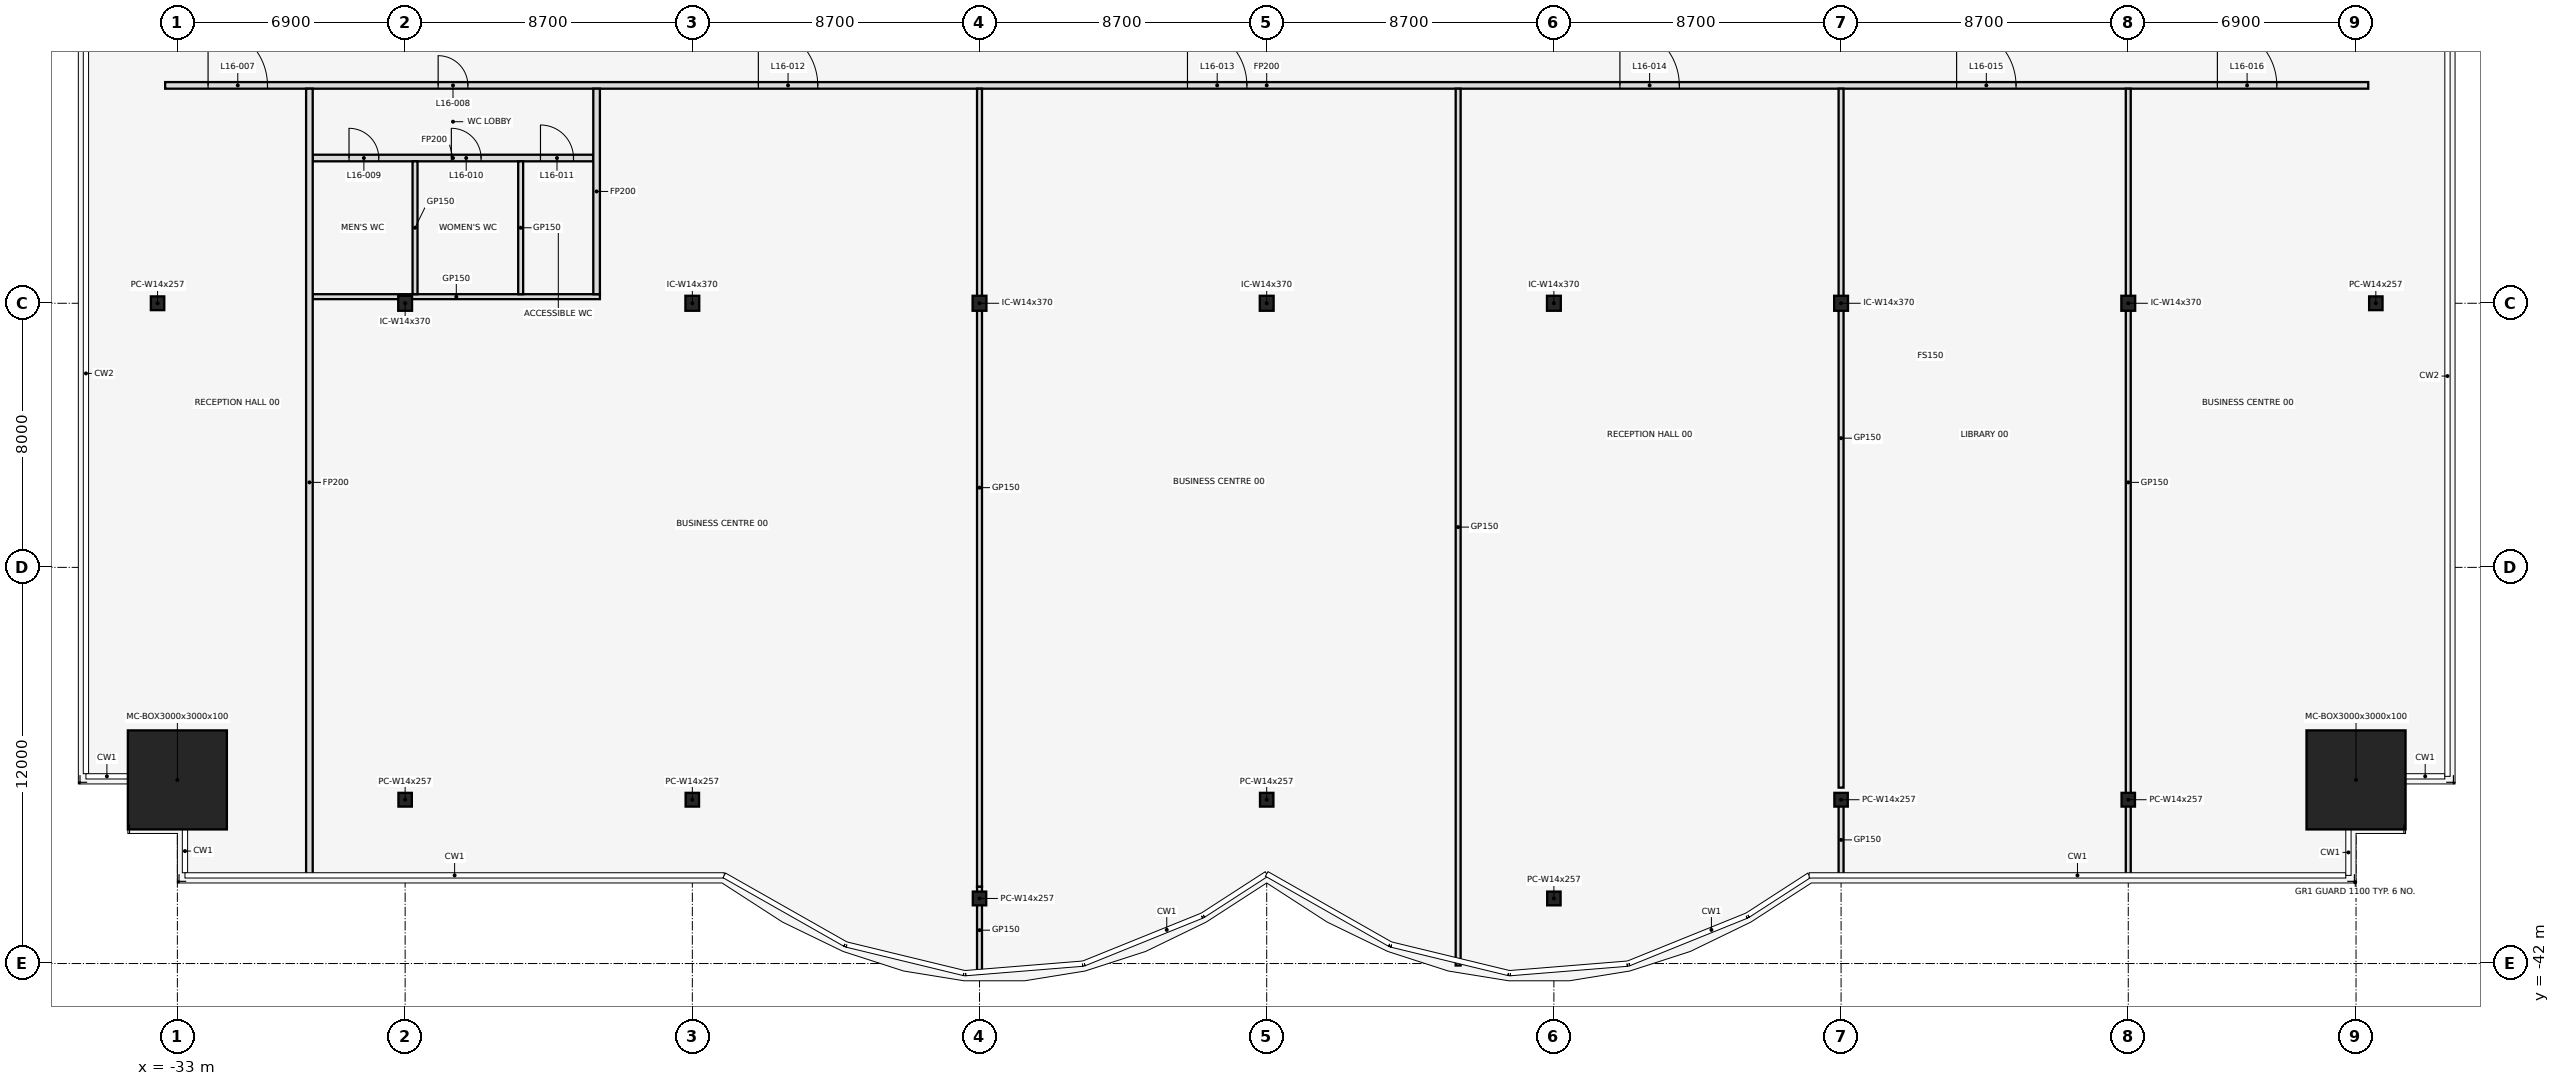
"""IFC4 building model, lengths in metres.
Left out: names, types, materials, properties, quantities, classifications, styles, units other than length and angle.
Written with IfcOpenShell. Run it as: python <this file> out.ifc"""

import sys

from ifc_helpers import new_model, si_unit, direction, frame, frame_2d, origin, origin_2d, place, context, subcontext, project, spatial, rectangle, hollow_rectangle, i_section, extrude, element, fill, save


model = new_model("IFC4")
c1 = context("Model", 3, precision=1e-05, world=origin(), true_north=direction((0.0, 1.0)))
c2 = subcontext(c1, "Body", "Model", "MODEL_VIEW")
j1 = project(units=[si_unit("LENGTHUNIT", "METRE"), si_unit("PLANEANGLEUNIT", "RADIAN")], contexts=[c1])
p1 = place(None, origin())
s1 = spatial("IfcSite", under=j1, at=p1, CompositionType="ELEMENT")
p2 = place(p1, origin())
s2 = spatial("IfcBuilding", under=s1, at=p2, CompositionType="ELEMENT")
p3 = place(p2, frame((0.0, 0.0, 80.0)))
s3 = spatial("IfcBuildingStorey", under=s2, at=p3, CompositionType="ELEMENT", Elevation=80.0)
p4 = place(p3, frame((-33.0, -36.438, 0.0), z_axis=(0.0, 0.0, 1.0), x_axis=(1.0, 0.0, 0.0)))
e1 = element("IfcColumn", 1, at=p4, inside=s3, PredefinedType="COLUMN", context=c2, shape_type="SweptSolid", body=[
    extrude(hollow_rectangle(XDim=3.0, YDim=3.0, WallThickness=0.1, at=origin_2d()), origin(), (0.0, 0.0, 1.0), 4.5),
])
for number, where, z_axis, x_axis in (
    (2, (-26.1, -37.038, 0.0), (0.0, 0.0, 1.0), (1.0, 0.0, 0.0)),
    (3, (-17.4, -37.038, 0.0), (0.0, 0.0, 1.0), (1.0, 0.0, 0.0)),
    (4, (-8.7, -40.029, 0.0), (0.0, 0.0, 1.0), (1.0, 0.0, 0.0)),
    (5, (0.0, -37.038, 0.0), (0.0, 0.0, 1.0), (1.0, 0.0, 0.0)),
    (6, (8.7, -40.029, 0.0), (0.0, 0.0, 1.0), (1.0, 0.0, 0.0)),
    (7, (17.4, -37.038, 0.0), (0.0, 0.0, 1.0), (1.0, 0.0, 0.0)),
    (8, (26.1, -37.038, 0.0), (0.0, 0.0, 1.0), (1.0, 0.0, 0.0)),
):
    element("IfcColumn", number, at=place(p3, frame(where, z_axis=z_axis, x_axis=x_axis)), inside=s3, PredefinedType="COLUMN", context=c2, shape_type="SweptSolid", body=[
        extrude(i_section(OverallWidth=0.406, OverallDepth=0.417, WebThickness=0.03, FlangeThickness=0.048, at=origin_2d()), origin(), (0.0, 0.0, 1.0), 4.5),
    ])
p5 = place(p3, frame((33.0, -36.438, 0.0), z_axis=(0.0, 0.0, 1.0), x_axis=(1.0, 0.0, 0.0)))
e9 = element("IfcColumn", 9, at=p5, inside=s3, PredefinedType="COLUMN", context=c2, shape_type="SweptSolid", body=[
    extrude(hollow_rectangle(XDim=3.0, YDim=3.0, WallThickness=0.1, at=origin_2d()), origin(), (0.0, 0.0, 1.0), 4.5),
])
for number, where, z_axis, x_axis in (
    (10, (-33.6, -22.0, 0.0), (0.0, 0.0, 1.0), (1.0, 0.0, 0.0)),
    (11, (33.6, -22.0, 0.0), (0.0, 0.0, 1.0), (1.0, 0.0, 0.0)),
):
    element("IfcColumn", number, at=place(p3, frame(where, z_axis=z_axis, x_axis=x_axis)), inside=s3, PredefinedType="COLUMN", context=c2, shape_type="SweptSolid", body=[
        extrude(i_section(OverallWidth=0.406, OverallDepth=0.417, WebThickness=0.03, FlangeThickness=0.048, at=origin_2d()), origin(), (0.0, 0.0, 1.0), 4.5),
    ])
for number, where, z_axis, x_axis in (
    (12, (-26.1, -22.0, 0.0), (0.0, 0.0, 1.0), (1.0, 0.0, 0.0)),
    (13, (-17.4, -22.0, 0.0), (0.0, 0.0, 1.0), (1.0, 0.0, 0.0)),
    (14, (-8.7, -22.0, 0.0), (0.0, 0.0, 1.0), (1.0, 0.0, 0.0)),
    (15, (0.0, -22.0, 0.0), (0.0, 0.0, 1.0), (1.0, 0.0, 0.0)),
    (16, (8.7, -22.0, 0.0), (0.0, 0.0, 1.0), (1.0, 0.0, 0.0)),
    (17, (17.4, -22.0, 0.0), (0.0, 0.0, 1.0), (1.0, 0.0, 0.0)),
    (18, (26.1, -22.0, 0.0), (0.0, 0.0, 1.0), (1.0, 0.0, 0.0)),
):
    element("IfcColumn", number, at=place(p3, frame(where, z_axis=z_axis, x_axis=x_axis)), inside=s3, PredefinedType="COLUMN", context=c2, shape_type="SweptSolid", body=[
        extrude(i_section(OverallWidth=0.419, OverallDepth=0.455, WebThickness=0.042, FlangeThickness=0.068, at=origin_2d()), origin(), (0.0, 0.0, 1.0), 4.5),
    ])
p6 = place(p3, frame((-28.9, -21.8, 0.0), z_axis=(0.0, 0.0, 1.0), x_axis=(1.0, 0.0, 0.0)))
e19 = element("IfcWall", 19, at=p6, inside=s3, PredefinedType="PARTITIONING", context=c2, shape_type="SweptSolid", body=[
    extrude(rectangle(XDim=8.7, YDim=0.15, at=frame_2d((4.35, 0.0))), origin(), (0.0, 0.0, 1.0), 3.368),
])
p7 = place(p3, frame((-28.9, -17.6, 0.0), z_axis=(0.0, 0.0, 1.0), x_axis=(1.0, 0.0, 0.0)))
e20 = element("IfcWall", 20, at=p7, inside=s3, PredefinedType="PARTITIONING", context=c2, shape_type="SweptSolid", body=[
    extrude(rectangle(XDim=8.5, YDim=0.2, at=frame_2d((4.25, 0.0))), origin(), (0.0, 0.0, 1.0), 3.368),
])
p8 = place(p7, frame((1.1, 0.0, 0.0)))
e21 = element("IfcOpeningElement", 21, at=p8, cuts=e20, PredefinedType="OPENING", context=c2, shape_type="SweptSolid", body=[
    extrude(rectangle(XDim=0.9, YDim=2.1, at=frame_2d((0.45, 1.05))), frame((0.0, 0.112, 0.0), z_axis=(0.0, -1.0, 0.0), x_axis=(1.0, 0.0, 0.0)), (0.0, 0.0, 1.0), 0.224),
])
p9 = place(p7, frame((4.2, 0.0, 0.0)))
e22 = element("IfcOpeningElement", 22, at=p9, cuts=e20, PredefinedType="OPENING", context=c2, shape_type="SweptSolid", body=[
    extrude(rectangle(XDim=0.9, YDim=2.1, at=frame_2d((0.45, 1.05))), frame((0.0, 0.112, 0.0), z_axis=(0.0, -1.0, 0.0), x_axis=(1.0, 0.0, 0.0)), (0.0, 0.0, 1.0), 0.224),
])
p10 = place(p7, frame((6.9, 0.0, 0.0)))
e23 = element("IfcOpeningElement", 23, at=p10, cuts=e20, PredefinedType="OPENING", context=c2, shape_type="SweptSolid", body=[
    extrude(rectangle(XDim=1.0, YDim=2.1, at=frame_2d((0.5, 1.05))), frame((0.0, 0.112, 0.0), z_axis=(0.0, -1.0, 0.0), x_axis=(1.0, 0.0, 0.0)), (0.0, 0.0, 1.0), 0.224),
])
p11 = place(p3, frame((-33.37, -15.4, 0.0), z_axis=(0.0, 0.0, 1.0), x_axis=(1.0, 0.0, 0.0)))
e24 = element("IfcWall", 24, at=p11, inside=s3, PredefinedType="PARTITIONING", context=c2, shape_type="SweptSolid", body=[
    extrude(rectangle(XDim=66.74, YDim=0.2, at=frame_2d((33.37, 0.0))), origin(), (0.0, 0.0, 1.0), 3.368),
])
p12 = place(p11, frame((1.3, 0.0, 0.0)))
e25 = element("IfcOpeningElement", 25, at=p12, cuts=e24, PredefinedType="OPENING", context=c2, shape_type="SweptSolid", body=[
    extrude(rectangle(XDim=1.8, YDim=2.1, at=frame_2d((0.9, 1.05))), frame((0.0, 0.112, 0.0), z_axis=(0.0, -1.0, 0.0), x_axis=(1.0, 0.0, 0.0)), (0.0, 0.0, 1.0), 0.224),
])
p13 = place(p11, frame((8.27, 0.0, 0.0)))
e26 = element("IfcOpeningElement", 26, at=p13, cuts=e24, PredefinedType="OPENING", context=c2, shape_type="SweptSolid", body=[
    extrude(rectangle(XDim=0.9, YDim=2.1, at=frame_2d((0.45, 1.05))), frame((0.0, 0.112, 0.0), z_axis=(0.0, -1.0, 0.0), x_axis=(1.0, 0.0, 0.0)), (0.0, 0.0, 1.0), 0.224),
])
p14 = place(p11, frame((17.97, 0.0, 0.0)))
e27 = element("IfcOpeningElement", 27, at=p14, cuts=e24, PredefinedType="OPENING", context=c2, shape_type="SweptSolid", body=[
    extrude(rectangle(XDim=1.8, YDim=2.1, at=frame_2d((0.9, 1.05))), frame((0.0, 0.112, 0.0), z_axis=(0.0, -1.0, 0.0), x_axis=(1.0, 0.0, 0.0)), (0.0, 0.0, 1.0), 0.224),
])
p15 = place(p11, frame((30.97, 0.0, 0.0)))
e28 = element("IfcOpeningElement", 28, at=p15, cuts=e24, PredefinedType="OPENING", context=c2, shape_type="SweptSolid", body=[
    extrude(rectangle(XDim=1.8, YDim=2.1, at=frame_2d((0.9, 1.05))), frame((0.0, 0.112, 0.0), z_axis=(0.0, -1.0, 0.0), x_axis=(1.0, 0.0, 0.0)), (0.0, 0.0, 1.0), 0.224),
])
p16 = place(p11, frame((44.07, 0.0, 0.0)))
e29 = element("IfcOpeningElement", 29, at=p16, cuts=e24, PredefinedType="OPENING", context=c2, shape_type="SweptSolid", body=[
    extrude(rectangle(XDim=1.8, YDim=2.1, at=frame_2d((0.9, 1.05))), frame((0.0, 0.112, 0.0), z_axis=(0.0, -1.0, 0.0), x_axis=(1.0, 0.0, 0.0)), (0.0, 0.0, 1.0), 0.224),
])
p17 = place(p11, frame((54.27, 0.0, 0.0)))
e30 = element("IfcOpeningElement", 30, at=p17, cuts=e24, PredefinedType="OPENING", context=c2, shape_type="SweptSolid", body=[
    extrude(rectangle(XDim=1.8, YDim=2.1, at=frame_2d((0.9, 1.05))), frame((0.0, 0.112, 0.0), z_axis=(0.0, -1.0, 0.0), x_axis=(1.0, 0.0, 0.0)), (0.0, 0.0, 1.0), 0.224),
])
p18 = place(p11, frame((62.17, 0.0, 0.0)))
e31 = element("IfcOpeningElement", 31, at=p18, cuts=e24, PredefinedType="OPENING", context=c2, shape_type="SweptSolid", body=[
    extrude(rectangle(XDim=1.8, YDim=2.1, at=frame_2d((0.9, 1.05))), frame((0.0, 0.112, 0.0), z_axis=(0.0, -1.0, 0.0), x_axis=(1.0, 0.0, 0.0)), (0.0, 0.0, 1.0), 0.224),
])
p19 = place(p3, frame((-29.0, -39.35, 0.0), z_axis=(0.0, 0.0, 1.0), x_axis=(0.0, 1.0, 0.0)))
e32 = element("IfcWall", 32, at=p19, inside=s3, PredefinedType="PARTITIONING", context=c2, shape_type="SweptSolid", body=[
    extrude(rectangle(XDim=23.85, YDim=0.2, at=frame_2d((11.925, 0.0))), origin(), (0.0, 0.0, 1.0), 3.368),
])
for number, where, z_axis, x_axis in (
    (33, (-25.8, -21.725, 0.0), (0.0, 0.0, 1.0), (0.0, 1.0, 0.0)),
    (34, (-22.6, -21.725, 0.0), (0.0, 0.0, 1.0), (0.0, 1.0, 0.0)),
):
    element("IfcWall", number, at=place(p3, frame(where, z_axis=z_axis, x_axis=x_axis)), inside=s3, PredefinedType="PARTITIONING", context=c2, shape_type="SweptSolid", body=[
        extrude(rectangle(XDim=4.025, YDim=0.15, at=frame_2d((2.013, 0.0))), origin(), (0.0, 0.0, 1.0), 3.368),
    ])
p20 = place(p3, frame((-20.3, -21.725, 0.0), z_axis=(0.0, 0.0, 1.0), x_axis=(0.0, 1.0, 0.0)))
e35 = element("IfcWall", 35, at=p20, inside=s3, PredefinedType="PARTITIONING", context=c2, shape_type="SweptSolid", body=[
    extrude(rectangle(XDim=6.225, YDim=0.2, at=frame_2d((3.113, 0.0))), origin(), (0.0, 0.0, 1.0), 3.368),
])
p21 = place(p3, frame((-8.7, -42.31, 0.0), z_axis=(0.0, 0.0, 1.0), x_axis=(0.0, 1.0, 0.0)))
e36 = element("IfcWall", 36, at=p21, inside=s3, PredefinedType="PARTITIONING", context=c2, shape_type="SweptSolid", body=[
    extrude(rectangle(XDim=2.64, YDim=0.15, at=frame_2d((1.32, 0.0))), origin(), (0.0, 0.0, 1.0), 3.368),
])
p22 = place(p3, frame((-8.7, -39.67, 0.0), z_axis=(0.0, 0.0, 1.0), x_axis=(0.0, 1.0, 0.0)))
e37 = element("IfcWall", 37, at=p22, inside=s3, PredefinedType="PARTITIONING", context=c2, shape_type="SweptSolid", body=[
    extrude(rectangle(XDim=24.17, YDim=0.15, at=frame_2d((12.085, 0.0))), origin(), (0.0, 0.0, 1.0), 3.368),
])
p23 = place(p3, frame((5.8, -42.06, 0.0), z_axis=(0.0, 0.0, 1.0), x_axis=(0.0, 1.0, 0.0)))
e38 = element("IfcWall", 38, at=p23, inside=s3, PredefinedType="PARTITIONING", context=c2, shape_type="SweptSolid", body=[
    extrude(rectangle(XDim=26.56, YDim=0.15, at=frame_2d((13.28, 0.0))), origin(), (0.0, 0.0, 1.0), 3.368),
])
p24 = place(p3, frame((17.4, -39.35, 0.0), z_axis=(0.0, 0.0, 1.0), x_axis=(0.0, 1.0, 0.0)))
e39 = element("IfcWall", 39, at=p24, inside=s3, PredefinedType="PARTITIONING", context=c2, shape_type="SweptSolid", body=[
    extrude(rectangle(XDim=2.19, YDim=0.15, at=frame_2d((1.095, 0.0))), origin(), (0.0, 0.0, 1.0), 3.368),
])
p25 = place(p3, frame((17.4, -36.672, 0.0), z_axis=(0.0, 0.0, 1.0), x_axis=(0.0, 1.0, 0.0)))
e40 = element("IfcWall", 40, at=p25, inside=s3, PredefinedType="PARTITIONING", context=c2, shape_type="SweptSolid", body=[
    extrude(rectangle(XDim=21.172, YDim=0.15, at=frame_2d((10.586, 0.0))), origin(), (0.0, 0.0, 1.0), 3.368),
])
p26 = place(p3, frame((26.1, -39.35, 0.0), z_axis=(0.0, 0.0, 1.0), x_axis=(0.0, 1.0, 0.0)))
e41 = element("IfcWall", 41, at=p26, inside=s3, PredefinedType="PARTITIONING", context=c2, shape_type="SweptSolid", body=[
    extrude(rectangle(XDim=23.85, YDim=0.15, at=frame_2d((11.925, 0.0))), origin(), (0.0, 0.0, 1.0), 3.368),
])
p27 = place(p12, origin())
e42 = element("IfcDoor", 42, at=p27, inside=s3, OperationType="SINGLE_SWING_LEFT", PredefinedType="DOOR", context=c2, shape_type="SweptSolid", body=[
    extrude(rectangle(XDim=1.8, YDim=2.1, at=frame_2d((0.9, 1.05))), frame((0.0, 0.025, 0.0), z_axis=(0.0, -1.0, 0.0), x_axis=(1.0, 0.0, 0.0)), (0.0, 0.0, 1.0), 0.05),
])
fill(e25, e42)
p28 = place(p13, frame((0.9, 0.0, 0.0), z_axis=(0.0, 0.0, 1.0), x_axis=(-1.0, 0.0, 0.0)))
e43 = element("IfcDoor", 43, at=p28, inside=s3, OperationType="SINGLE_SWING_RIGHT", PredefinedType="DOOR", context=c2, shape_type="SweptSolid", body=[
    extrude(rectangle(XDim=0.9, YDim=2.1, at=frame_2d((0.45, 1.05))), frame((0.0, 0.025, 0.0), z_axis=(0.0, -1.0, 0.0), x_axis=(1.0, 0.0, 0.0)), (0.0, 0.0, 1.0), 0.05),
])
fill(e26, e43)
p29 = place(p8, frame((0.9, 0.0, 0.0), z_axis=(0.0, 0.0, 1.0), x_axis=(-1.0, 0.0, 0.0)))
e44 = element("IfcDoor", 44, at=p29, inside=s3, OperationType="SINGLE_SWING_RIGHT", PredefinedType="DOOR", context=c2, shape_type="SweptSolid", body=[
    extrude(rectangle(XDim=0.9, YDim=2.1, at=frame_2d((0.45, 1.05))), frame((0.0, 0.025, 0.0), z_axis=(0.0, -1.0, 0.0), x_axis=(1.0, 0.0, 0.0)), (0.0, 0.0, 1.0), 0.05),
])
fill(e21, e44)
p30 = place(p9, frame((0.9, 0.0, 0.0), z_axis=(0.0, 0.0, 1.0), x_axis=(-1.0, 0.0, 0.0)))
e45 = element("IfcDoor", 45, at=p30, inside=s3, OperationType="SINGLE_SWING_LEFT", PredefinedType="DOOR", context=c2, shape_type="SweptSolid", body=[
    extrude(rectangle(XDim=0.9, YDim=2.1, at=frame_2d((0.45, 1.05))), frame((0.0, 0.025, 0.0), z_axis=(0.0, -1.0, 0.0), x_axis=(1.0, 0.0, 0.0)), (0.0, 0.0, 1.0), 0.05),
])
fill(e22, e45)
p31 = place(p10, frame((1.0, 0.0, 0.0), z_axis=(0.0, 0.0, 1.0), x_axis=(-1.0, 0.0, 0.0)))
e46 = element("IfcDoor", 46, at=p31, inside=s3, OperationType="SINGLE_SWING_RIGHT", PredefinedType="DOOR", context=c2, shape_type="SweptSolid", body=[
    extrude(rectangle(XDim=1.0, YDim=2.1, at=frame_2d((0.5, 1.05))), frame((0.0, 0.025, 0.0), z_axis=(0.0, -1.0, 0.0), x_axis=(1.0, 0.0, 0.0)), (0.0, 0.0, 1.0), 0.05),
])
fill(e23, e46)
p32 = place(p14, origin())
e47 = element("IfcDoor", 47, at=p32, inside=s3, OperationType="SINGLE_SWING_LEFT", PredefinedType="DOOR", context=c2, shape_type="SweptSolid", body=[
    extrude(rectangle(XDim=1.8, YDim=2.1, at=frame_2d((0.9, 1.05))), frame((0.0, 0.025, 0.0), z_axis=(0.0, -1.0, 0.0), x_axis=(1.0, 0.0, 0.0)), (0.0, 0.0, 1.0), 0.05),
])
fill(e27, e47)
p33 = place(p15, origin())
e48 = element("IfcDoor", 48, at=p33, inside=s3, OperationType="SINGLE_SWING_LEFT", PredefinedType="DOOR", context=c2, shape_type="SweptSolid", body=[
    extrude(rectangle(XDim=1.8, YDim=2.1, at=frame_2d((0.9, 1.05))), frame((0.0, 0.025, 0.0), z_axis=(0.0, -1.0, 0.0), x_axis=(1.0, 0.0, 0.0)), (0.0, 0.0, 1.0), 0.05),
])
fill(e28, e48)
p34 = place(p16, origin())
e49 = element("IfcDoor", 49, at=p34, inside=s3, OperationType="SINGLE_SWING_LEFT", PredefinedType="DOOR", context=c2, shape_type="SweptSolid", body=[
    extrude(rectangle(XDim=1.8, YDim=2.1, at=frame_2d((0.9, 1.05))), frame((0.0, 0.025, 0.0), z_axis=(0.0, -1.0, 0.0), x_axis=(1.0, 0.0, 0.0)), (0.0, 0.0, 1.0), 0.05),
])
fill(e29, e49)
p35 = place(p17, origin())
e50 = element("IfcDoor", 50, at=p35, inside=s3, OperationType="SINGLE_SWING_LEFT", PredefinedType="DOOR", context=c2, shape_type="SweptSolid", body=[
    extrude(rectangle(XDim=1.8, YDim=2.1, at=frame_2d((0.9, 1.05))), frame((0.0, 0.025, 0.0), z_axis=(0.0, -1.0, 0.0), x_axis=(1.0, 0.0, 0.0)), (0.0, 0.0, 1.0), 0.05),
])
fill(e30, e50)
p36 = place(p18, origin())
e51 = element("IfcDoor", 51, at=p36, inside=s3, OperationType="SINGLE_SWING_LEFT", PredefinedType="DOOR", context=c2, shape_type="SweptSolid", body=[
    extrude(rectangle(XDim=1.8, YDim=2.1, at=frame_2d((0.9, 1.05))), frame((0.0, 0.025, 0.0), z_axis=(0.0, -1.0, 0.0), x_axis=(1.0, 0.0, 0.0)), (0.0, 0.0, 1.0), 0.05),
])
fill(e31, e51)
save(model, sys.argv[1])
